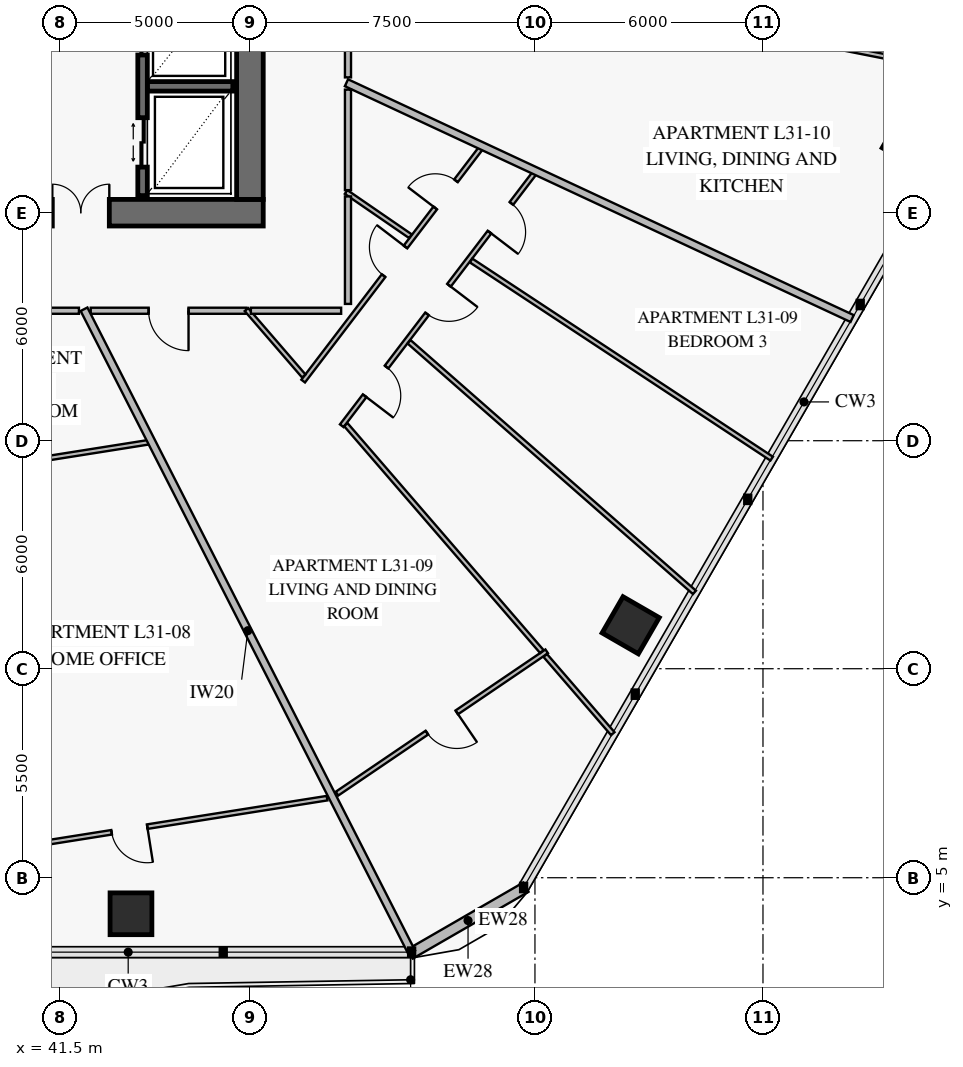
"""IFC4 building model, lengths in metres.
Left out: names, types, materials, properties, quantities, classifications, styles, units other than length and angle.
Written with IfcOpenShell. Run it as: python <this file> out.ifc"""

import sys

from ifc_helpers import new_model, si_unit, direction, frame, frame_2d, origin, origin_2d, place, context, subcontext, project, spatial, rectangle, extrude, element, fill, save


model = new_model("IFC4")
c1 = context("Model", 3, precision=1e-05, world=origin(), true_north=direction((0.0, 1.0)))
c2 = subcontext(c1, "Body", "Model", "MODEL_VIEW")
j1 = project(units=[si_unit("LENGTHUNIT", "METRE"), si_unit("PLANEANGLEUNIT", "RADIAN")], contexts=[c1])
p1 = place(None, origin())
s1 = spatial("IfcSite", under=j1, at=p1, CompositionType="ELEMENT")
p2 = place(p1, origin())
s2 = spatial("IfcBuilding", under=s1, at=p2, CompositionType="ELEMENT")
p3 = place(p2, frame((0.0, 0.0, 126.6)))
s3 = spatial("IfcBuildingStorey", under=s2, at=p3, CompositionType="ELEMENT", Elevation=126.6)
p4 = place(p3, frame((37.35, 22.5, 0.0), z_axis=(0.0, 0.0, 1.0), x_axis=(1.0, 0.0, 0.0)))
e1 = element("IfcWall", 1, at=p4, inside=s3, PredefinedType="SHEAR", context=c2, shape_type="SweptSolid", body=[
    extrude(rectangle(XDim=9.5, YDim=0.7, at=frame_2d((4.75, 0.0))), origin(), (0.0, 0.0, 1.0), 3.8),
])
p5 = place(p4, frame((3.95, 0.0, 0.0)))
e2 = element("IfcOpeningElement", 2, at=p5, cuts=e1, PredefinedType="OPENING", context=c2, shape_type="SweptSolid", body=[
    extrude(rectangle(XDim=1.5, YDim=2.15, at=frame_2d((0.75, 1.075))), frame((0.0, 0.362, 0.0), z_axis=(0.0, -1.0, 0.0), x_axis=(1.0, 0.0, 0.0)), (0.0, 0.0, 1.0), 0.724),
])
p6 = place(p3, frame((46.5, 22.85, 0.0), z_axis=(0.0, 0.0, 1.0), x_axis=(0.0, 1.0, 0.0)))
e3 = element("IfcWall", 3, at=p6, inside=s3, PredefinedType="SHEAR", context=c2, shape_type="SweptSolid", body=[
    extrude(rectangle(XDim=18.3, YDim=0.7, at=frame_2d((9.15, 0.0))), origin(), (0.0, 0.0, 1.0), 3.8),
])
p7 = place(p6, frame((8.9, 0.0, 0.0)))
e4 = element("IfcOpeningElement", 4, at=p7, cuts=e3, PredefinedType="OPENING", context=c2, shape_type="SweptSolid", body=[
    extrude(rectangle(XDim=1.1, YDim=2.15, at=frame_2d((0.55, 1.075))), frame((0.0, 0.362, 0.0), z_axis=(0.0, -1.0, 0.0), x_axis=(1.0, 0.0, 0.0)), (0.0, 0.0, 1.0), 0.724),
])
for number, where, z_axis, x_axis in (
    (5, (43.37, 4.052, 0.0), (0.0, 0.0, 1.0), (1.0, 0.0, 0.0)),
    (6, (56.519, 11.643, 0.0), (0.0, 0.0, 1.0), (0.5, 0.866, 0.0)),
    (7, (63.889, 24.408, 0.0), (0.0, 0.0, 1.0), (0.5, 0.866, 0.0)),
):
    element("IfcColumn", number, at=place(p3, frame(where, z_axis=z_axis, x_axis=x_axis)), inside=s3, PredefinedType="COLUMN", context=c2, shape_type="SweptSolid", body=[
        extrude(rectangle(XDim=1.1, YDim=1.1, at=origin_2d()), origin(), (0.0, 0.0, 1.0), 3.55),
    ])
p8 = place(p3, frame((53.761, 4.751, 0.0), z_axis=(0.0, 0.0, 1.0), x_axis=(-0.866007452331, -0.500031091541, 0.0)))
e8 = element("IfcWall", 8, at=p8, inside=s3, PredefinedType="SOLIDWALL", context=c2, shape_type="SweptSolid", body=[
    extrude(rectangle(XDim=3.515, YDim=0.28, at=frame_2d((1.757, 0.0))), origin(), (0.0, 0.0, 1.0), 3.55),
])
p9 = place(p3, frame((43.8, 25.825, 0.0), z_axis=(0.0, 0.0, 1.0), x_axis=(1.0, 0.0, 0.0)))
e9 = element("IfcWall", 9, at=p9, inside=s3, PredefinedType="SOLIDWALL", context=c2, shape_type="SweptSolid", body=[
    extrude(rectangle(XDim=2.25, YDim=0.25, at=frame_2d((1.125, 0.0))), origin(), (0.0, 0.0, 1.0), 3.8),
])
p10 = place(p3, frame((43.675, 22.95, 0.0), z_axis=(0.0, 0.0, 1.0), x_axis=(0.0, 1.0, 0.0)))
e10 = element("IfcWall", 10, at=p10, inside=s3, PredefinedType="SOLIDWALL", context=c2, shape_type="SweptSolid", body=[
    extrude(rectangle(XDim=8.2, YDim=0.25, at=frame_2d((4.1, 0.0))), origin(), (0.0, 0.0, 1.0), 3.8),
])
p11 = place(p10, frame((0.75, 0.0, 0.0)))
e11 = element("IfcOpeningElement", 11, at=p11, cuts=e10, PredefinedType="OPENING", context=c2, shape_type="SweptSolid", body=[
    extrude(rectangle(XDim=1.3, YDim=2.3, at=frame_2d((0.65, 1.15))), frame((0.0, 0.137, 0.0), z_axis=(0.0, -1.0, 0.0), x_axis=(1.0, 0.0, 0.0)), (0.0, 0.0, 1.0), 0.274),
])
p12 = place(p10, frame((3.7, 0.0, 0.0)))
e12 = element("IfcOpeningElement", 12, at=p12, cuts=e10, PredefinedType="OPENING", context=c2, shape_type="SweptSolid", body=[
    extrude(rectangle(XDim=1.3, YDim=2.3, at=frame_2d((0.65, 1.15))), frame((0.0, 0.137, 0.0), z_axis=(0.0, -1.0, 0.0), x_axis=(1.0, 0.0, 0.0)), (0.0, 0.0, 1.0), 0.274),
])
p13 = place(p10, frame((6.62, 0.0, 0.0)))
e13 = element("IfcOpeningElement", 13, at=p13, cuts=e10, PredefinedType="OPENING", context=c2, shape_type="SweptSolid", body=[
    extrude(rectangle(XDim=0.9, YDim=2.1, at=frame_2d((0.45, 1.05))), frame((0.0, 0.137, 0.0), z_axis=(0.0, -1.0, 0.0), x_axis=(1.0, 0.0, 0.0)), (0.0, 0.0, 1.0), 0.274),
])
p14 = place(p3, frame((38.296, 5.473, 0.0), z_axis=(0.0, 0.0, 1.0), x_axis=(0.987688342725, 0.156434451591, 0.0)))
e14 = element("IfcWall", 14, at=p14, inside=s3, PredefinedType="PARTITIONING", context=c2, shape_type="SweptSolid", body=[
    extrude(rectangle(XDim=10.361, YDim=0.12, at=frame_2d((5.181, 0.0))), origin(), (0.0, 0.0, 1.0), 2.8),
])
p15 = place(p14, frame((4.622, 0.0, 0.0)))
e15 = element("IfcOpeningElement", 15, at=p15, cuts=e14, PredefinedType="OPENING", context=c2, shape_type="SweptSolid", body=[
    extrude(rectangle(XDim=0.95, YDim=2.1, at=frame_2d((0.475, 1.05))), frame((0.0, 0.072, 0.0), z_axis=(0.0, -1.0, 0.0), x_axis=(1.0, 0.0, 0.0)), (0.0, 0.0, 1.0), 0.144),
])
p16 = place(p3, frame((48.791, 7.212, 0.0), z_axis=(0.0, 0.0, 1.0), x_axis=(0.82746544618, 0.561516638559, 0.0)))
e16 = element("IfcWall", 16, at=p16, inside=s3, PredefinedType="PARTITIONING", context=c2, shape_type="SweptSolid", body=[
    extrude(rectangle(XDim=6.668, YDim=0.12, at=frame_2d((3.334, 0.0))), origin(), (0.0, 0.0, 1.0), 2.8),
])
p17 = place(p16, frame((2.859, 0.0, 0.0)))
e17 = element("IfcOpeningElement", 17, at=p17, cuts=e16, PredefinedType="OPENING", context=c2, shape_type="SweptSolid", body=[
    extrude(rectangle(XDim=0.95, YDim=2.1, at=frame_2d((0.475, 1.05))), frame((0.0, 0.072, 0.0), z_axis=(0.0, -1.0, 0.0), x_axis=(1.0, 0.0, 0.0)), (0.0, 0.0, 1.0), 0.144),
])
p18 = place(p3, frame((47.901, 18.069, 0.0), z_axis=(0.0, 0.0, 1.0), x_axis=(0.606532258444, 0.795058877988, 0.0)))
e18 = element("IfcWall", 18, at=p18, inside=s3, PredefinedType="PARTITIONING", context=c2, shape_type="SweptSolid", body=[
    extrude(rectangle(XDim=7.714, YDim=0.12, at=frame_2d((3.857, 0.0))), origin(), (0.0, 0.0, 1.0), 2.85),
])
p19 = place(p18, frame((3.489, 0.0, 0.0)))
e19 = element("IfcOpeningElement", 19, at=p19, cuts=e18, PredefinedType="OPENING", context=c2, shape_type="SweptSolid", body=[
    extrude(rectangle(XDim=0.95, YDim=2.1, at=frame_2d((0.475, 1.05))), frame((0.0, 0.072, 0.0), z_axis=(0.0, -1.0, 0.0), x_axis=(1.0, 0.0, 0.0)), (0.0, 0.0, 1.0), 0.144),
])
p20 = place(p18, frame((5.729, 0.0, 0.0)))
e20 = element("IfcOpeningElement", 20, at=p20, cuts=e18, PredefinedType="OPENING", context=c2, shape_type="SweptSolid", body=[
    extrude(rectangle(XDim=0.9, YDim=2.1, at=frame_2d((0.45, 1.05))), frame((0.0, 0.072, 0.0), z_axis=(0.0, -1.0, 0.0), x_axis=(1.0, 0.0, 0.0)), (0.0, 0.0, 1.0), 0.144),
])
p21 = place(p3, frame((48.917, 16.894, 0.0), z_axis=(0.0, 0.0, 1.0), x_axis=(0.606532810855, 0.795058456566, 0.0)))
e21 = element("IfcWall", 21, at=p21, inside=s3, PredefinedType="PARTITIONING", context=c2, shape_type="SweptSolid", body=[
    extrude(rectangle(XDim=8.352, YDim=0.12, at=frame_2d((4.176, 0.0))), origin(), (0.0, 0.0, 1.0), 2.85),
])
p22 = place(p21, frame((0.993, 0.0, 0.0)))
e22 = element("IfcOpeningElement", 22, at=p22, cuts=e21, PredefinedType="OPENING", context=c2, shape_type="SweptSolid", body=[
    extrude(rectangle(XDim=0.95, YDim=2.1, at=frame_2d((0.475, 1.05))), frame((0.0, 0.072, 0.0), z_axis=(0.0, -1.0, 0.0), x_axis=(1.0, 0.0, 0.0)), (0.0, 0.0, 1.0), 0.144),
])
p23 = place(p21, frame((3.701, 0.0, 0.0)))
e23 = element("IfcOpeningElement", 23, at=p23, cuts=e21, PredefinedType="OPENING", context=c2, shape_type="SweptSolid", body=[
    extrude(rectangle(XDim=0.95, YDim=2.1, at=frame_2d((0.475, 1.05))), frame((0.0, 0.072, 0.0), z_axis=(0.0, -1.0, 0.0), x_axis=(1.0, 0.0, 0.0)), (0.0, 0.0, 1.0), 0.144),
])
p24 = place(p21, frame((6.409, 0.0, 0.0)))
e24 = element("IfcOpeningElement", 24, at=p24, cuts=e21, PredefinedType="OPENING", context=c2, shape_type="SweptSolid", body=[
    extrude(rectangle(XDim=0.95, YDim=2.1, at=frame_2d((0.475, 1.05))), frame((0.0, 0.072, 0.0), z_axis=(0.0, -1.0, 0.0), x_axis=(1.0, 0.0, 0.0)), (0.0, 0.0, 1.0), 0.144),
])
p25 = place(p3, frame((42.311, 19.92, 0.0), z_axis=(0.0, 0.0, 1.0), x_axis=(1.0, 0.0, 0.0)))
e25 = element("IfcWall", 25, at=p25, inside=s3, PredefinedType="PARTITIONING", context=c2, shape_type="SweptSolid", body=[
    extrude(rectangle(XDim=4.097, YDim=0.16, at=frame_2d((2.049, 0.0))), origin(), (0.0, 0.0, 1.0), 3.55),
])
p26 = place(p25, frame((1.523, 0.0, 0.0)))
e26 = element("IfcOpeningElement", 26, at=p26, cuts=e25, PredefinedType="OPENING", context=c2, shape_type="SweptSolid", body=[
    extrude(rectangle(XDim=1.05, YDim=2.15, at=frame_2d((0.525, 1.075))), frame((0.0, 0.092, 0.0), z_axis=(0.0, -1.0, 0.0), x_axis=(1.0, 0.0, 0.0)), (0.0, 0.0, 1.0), 0.184),
])
p27 = place(p3, frame((53.21, 28.592, 0.0), z_axis=(0.0, 0.0, 1.0), x_axis=(0.980957842049, -0.1942207819, 0.0)))
e27 = element("IfcWall", 27, at=p27, inside=s3, PredefinedType="PARTITIONING", context=c2, shape_type="SweptSolid", body=[
    extrude(rectangle(XDim=10.678, YDim=0.12, at=frame_2d((5.339, 0.0))), origin(), (0.0, 0.0, 1.0), 3.1),
])
p28 = place(p27, frame((4.839, 0.0, 0.0)))
e28 = element("IfcOpeningElement", 28, at=p28, cuts=e27, PredefinedType="OPENING", context=c2, shape_type="SweptSolid", body=[
    extrude(rectangle(XDim=0.95, YDim=2.1, at=frame_2d((0.475, 1.05))), frame((0.0, 0.072, 0.0), z_axis=(0.0, -1.0, 0.0), x_axis=(1.0, 0.0, 0.0)), (0.0, 0.0, 1.0), 0.144),
])
p29 = place(p3, frame((49.08, 26.061, 0.0), z_axis=(0.0, 0.0, 1.0), x_axis=(0.0, 1.0, 0.0)))
e29 = element("IfcWall", 29, at=p29, inside=s3, PredefinedType="PARTITIONING", context=c2, shape_type="SweptSolid", body=[
    extrude(rectangle(XDim=3.329, YDim=0.16, at=frame_2d((1.664, 0.0))), origin(), (0.0, 0.0, 1.0), 2.85),
])
p30 = place(p29, frame((1.139, 0.0, 0.0)))
e30 = element("IfcOpeningElement", 30, at=p30, cuts=e29, PredefinedType="OPENING", context=c2, shape_type="SweptSolid", body=[
    extrude(rectangle(XDim=1.05, YDim=2.15, at=frame_2d((0.525, 1.075))), frame((0.0, 0.092, 0.0), z_axis=(0.0, -1.0, 0.0), x_axis=(1.0, 0.0, 0.0)), (0.0, 0.0, 1.0), 0.184),
])
p31 = place(p3, frame((37.458, 15.45, 0.0), z_axis=(0.0, 0.0, 1.0), x_axis=(0.987687698578, 0.156438518521, 0.0)))
e31 = element("IfcWall", 31, at=p31, inside=s3, PredefinedType="PARTITIONING", context=c2, shape_type="SweptSolid", body=[
    extrude(rectangle(XDim=6.48, YDim=0.12, at=frame_2d((3.24, 0.0))), origin(), (0.0, 0.0, 1.0), 2.85),
])
p32 = place(p3, frame((42.135, 19.96, 0.0), z_axis=(0.0, 0.0, 1.0), x_axis=(0.453989534113, -0.891007016199, 0.0)))
e32 = element("IfcWall", 32, at=p32, inside=s3, PredefinedType="PARTITIONING", context=c2, shape_type="SweptSolid", body=[
    extrude(rectangle(XDim=18.988, YDim=0.2, at=frame_2d((9.494, 0.0))), origin(), (0.0, 0.0, 1.0), 2.8),
])
p33 = place(p3, frame((49.03, 23.045, 0.0), z_axis=(0.0, 0.0, 1.0), x_axis=(0.824090441083, -0.5664582464, 0.0)))
e33 = element("IfcWall", 33, at=p33, inside=s3, PredefinedType="PARTITIONING", context=c2, shape_type="SweptSolid", body=[
    extrude(rectangle(XDim=2.055, YDim=0.12, at=frame_2d((1.028, 0.0))), origin(), (0.0, 0.0, 1.0), 3.55),
])
p34 = place(p3, frame((50.687, 19.103, 0.0), z_axis=(0.0, 0.0, 1.0), x_axis=(0.75142693105, -0.659816313297, 0.0)))
e34 = element("IfcWall", 34, at=p34, inside=s3, PredefinedType="PARTITIONING", context=c2, shape_type="SweptSolid", body=[
    extrude(rectangle(XDim=9.994, YDim=0.12, at=frame_2d((4.997, 0.0))), origin(), (0.0, 0.0, 1.0), 2.8),
])
p35 = place(p3, frame((52.319, 21.242, 0.0), z_axis=(0.0, 0.0, 1.0), x_axis=(0.834917563822, -0.550375019075, 0.0)))
e35 = element("IfcWall", 35, at=p35, inside=s3, PredefinedType="PARTITIONING", context=c2, shape_type="SweptSolid", body=[
    extrude(rectangle(XDim=9.473, YDim=0.12, at=frame_2d((4.737, 0.0))), origin(), (0.0, 0.0, 1.0), 2.8),
])
p36 = place(p3, frame((46.408, 19.951, 0.0), z_axis=(0.0, 0.0, 1.0), x_axis=(0.653633631907, -0.756811122566, 0.0)))
e36 = element("IfcWall", 36, at=p36, inside=s3, PredefinedType="PARTITIONING", context=c2, shape_type="SweptSolid", body=[
    extrude(rectangle(XDim=2.309, YDim=0.12, at=frame_2d((1.155, 0.0))), origin(), (0.0, 0.0, 1.0), 3.55),
])
p37 = place(p3, frame((49.024, 16.923, 0.0), z_axis=(0.0, 0.0, 1.0), x_axis=(0.653686738758, -0.756765252619, 0.0)))
e37 = element("IfcWall", 37, at=p37, inside=s3, PredefinedType="PARTITIONING", context=c2, shape_type="SweptSolid", body=[
    extrude(rectangle(XDim=7.889, YDim=0.12, at=frame_2d((3.945, 0.0))), origin(), (0.0, 0.0, 1.0), 3.1),
])
p38 = place(p3, frame((54.271, 10.848, 0.0), z_axis=(0.0, 0.0, 1.0), x_axis=(0.653692329301, -0.756760423524, 0.0)))
e38 = element("IfcWall", 38, at=p38, inside=s3, PredefinedType="PARTITIONING", context=c2, shape_type="SweptSolid", body=[
    extrude(rectangle(XDim=2.719, YDim=0.12, at=frame_2d((1.36, 0.0))), origin(), (0.0, 0.0, 1.0), 2.8),
])
p39 = place(p3, frame((49.04, 25.919, 0.0), z_axis=(0.0, 0.0, 1.0), x_axis=(0.90630970467, -0.422614149338, 0.0)))
e39 = element("IfcWall", 39, at=p39, inside=s3, PredefinedType="PARTITIONING", context=c2, shape_type="SweptSolid", body=[
    extrude(rectangle(XDim=14.681, YDim=0.2, at=frame_2d((7.34, 0.0))), origin(), (0.0, 0.0, 1.0), 2.8),
])
p40 = place(p3, frame((37.083, 19.92, 0.0), z_axis=(0.0, 0.0, 1.0), x_axis=(1.0, 0.0, 0.0)))
e40 = element("IfcWall", 40, at=p40, inside=s3, PredefinedType="PARTITIONING", context=c2, shape_type="SweptSolid", body=[
    extrude(rectangle(XDim=4.918, YDim=0.16, at=frame_2d((2.459, 0.0))), origin(), (0.0, 0.0, 1.0), 2.85),
])
p41 = place(p3, frame((49.08, 20.1, 0.0), z_axis=(0.0, 0.0, 1.0), x_axis=(0.0, 1.0, 0.0)))
e41 = element("IfcWall", 41, at=p41, inside=s3, PredefinedType="PARTITIONING", context=c2, shape_type="SweptSolid", body=[
    extrude(rectangle(XDim=2.828, YDim=0.16, at=frame_2d((1.414, 0.0))), origin(), (0.0, 0.0, 1.0), 3.55),
])
p42 = place(p3, frame((46.524, 19.92, 0.0), z_axis=(0.0, 0.0, 1.0), x_axis=(1.0, 0.0, 0.0)))
e42 = element("IfcWall", 42, at=p42, inside=s3, PredefinedType="PARTITIONING", context=c2, shape_type="SweptSolid", body=[
    extrude(rectangle(XDim=2.375, YDim=0.16, at=frame_2d((1.188, 0.0))), origin(), (0.0, 0.0, 1.0), 2.85),
])
p43 = place(p3, frame((49.08, 23.094, 0.0), z_axis=(0.0, 0.0, 1.0), x_axis=(0.0, 1.0, 0.0)))
e43 = element("IfcWall", 43, at=p43, inside=s3, PredefinedType="PARTITIONING", context=c2, shape_type="SweptSolid", body=[
    extrude(rectangle(XDim=2.646, YDim=0.16, at=frame_2d((1.323, 0.0))), origin(), (0.0, 0.0, 1.0), 3.55),
])
p44 = place(p5, origin())
e44 = element("IfcDoor", 44, at=p44, inside=s3, OperationType="DOUBLE_DOOR_SINGLE_SWING", PredefinedType="DOOR", context=c2, shape_type="SweptSolid", body=[
    extrude(rectangle(XDim=1.5, YDim=2.15, at=frame_2d((0.75, 1.075))), frame((0.0, 0.025, 0.0), z_axis=(0.0, -1.0, 0.0), x_axis=(1.0, 0.0, 0.0)), (0.0, 0.0, 1.0), 0.05),
])
fill(e2, e44)
p45 = place(p11, origin())
e45 = element("IfcDoor", 45, at=p45, inside=s3, OperationType="DOUBLE_DOOR_SLIDING", PredefinedType="DOOR", context=c2, shape_type="SweptSolid", body=[
    extrude(rectangle(XDim=1.3, YDim=2.3, at=frame_2d((0.65, 1.15))), frame((0.0, 0.025, 0.0), z_axis=(0.0, -1.0, 0.0), x_axis=(1.0, 0.0, 0.0)), (0.0, 0.0, 1.0), 0.05),
])
fill(e11, e45)
p46 = place(p12, origin())
e46 = element("IfcDoor", 46, at=p46, inside=s3, OperationType="DOUBLE_DOOR_SLIDING", PredefinedType="DOOR", context=c2, shape_type="SweptSolid", body=[
    extrude(rectangle(XDim=1.3, YDim=2.3, at=frame_2d((0.65, 1.15))), frame((0.0, 0.025, 0.0), z_axis=(0.0, -1.0, 0.0), x_axis=(1.0, 0.0, 0.0)), (0.0, 0.0, 1.0), 0.05),
])
fill(e12, e46)
p47 = place(p15, frame((0.95, 0.0, 0.0), z_axis=(0.0, 0.0, 1.0), x_axis=(-1.0, 0.0, 0.0)))
e47 = element("IfcDoor", 47, at=p47, inside=s3, OperationType="SINGLE_SWING_LEFT", PredefinedType="DOOR", context=c2, shape_type="SweptSolid", body=[
    extrude(rectangle(XDim=0.95, YDim=2.1, at=frame_2d((0.475, 1.05))), frame((0.0, 0.025, 0.0), z_axis=(0.0, -1.0, 0.0), x_axis=(1.0, 0.0, 0.0)), (0.0, 0.0, 1.0), 0.05),
])
fill(e15, e47)
p48 = place(p17, frame((0.95, 0.0, 0.0), z_axis=(0.0, 0.0, 1.0), x_axis=(-1.0, 0.0, 0.0)))
e48 = element("IfcDoor", 48, at=p48, inside=s3, OperationType="SINGLE_SWING_LEFT", PredefinedType="DOOR", context=c2, shape_type="SweptSolid", body=[
    extrude(rectangle(XDim=0.95, YDim=2.1, at=frame_2d((0.475, 1.05))), frame((0.0, 0.025, 0.0), z_axis=(0.0, -1.0, 0.0), x_axis=(1.0, 0.0, 0.0)), (0.0, 0.0, 1.0), 0.05),
])
fill(e17, e48)
p49 = place(p19, origin())
e49 = element("IfcDoor", 49, at=p49, inside=s3, OperationType="SINGLE_SWING_RIGHT", PredefinedType="DOOR", context=c2, shape_type="SweptSolid", body=[
    extrude(rectangle(XDim=0.95, YDim=2.1, at=frame_2d((0.475, 1.05))), frame((0.0, 0.025, 0.0), z_axis=(0.0, -1.0, 0.0), x_axis=(1.0, 0.0, 0.0)), (0.0, 0.0, 1.0), 0.05),
])
fill(e19, e49)
p50 = place(p20, origin())
e50 = element("IfcDoor", 50, at=p50, inside=s3, OperationType="SINGLE_SWING_LEFT", PredefinedType="DOOR", context=c2, shape_type="SweptSolid", body=[
    extrude(rectangle(XDim=0.9, YDim=2.1, at=frame_2d((0.45, 1.05))), frame((0.0, 0.025, 0.0), z_axis=(0.0, -1.0, 0.0), x_axis=(1.0, 0.0, 0.0)), (0.0, 0.0, 1.0), 0.05),
])
fill(e20, e50)
p51 = place(p22, frame((0.95, 0.0, 0.0), z_axis=(0.0, 0.0, 1.0), x_axis=(-1.0, 0.0, 0.0)))
e51 = element("IfcDoor", 51, at=p51, inside=s3, OperationType="SINGLE_SWING_RIGHT", PredefinedType="DOOR", context=c2, shape_type="SweptSolid", body=[
    extrude(rectangle(XDim=0.95, YDim=2.1, at=frame_2d((0.475, 1.05))), frame((0.0, 0.025, 0.0), z_axis=(0.0, -1.0, 0.0), x_axis=(1.0, 0.0, 0.0)), (0.0, 0.0, 1.0), 0.05),
])
fill(e22, e51)
p52 = place(p23, frame((0.95, 0.0, 0.0), z_axis=(0.0, 0.0, 1.0), x_axis=(-1.0, 0.0, 0.0)))
e52 = element("IfcDoor", 52, at=p52, inside=s3, OperationType="SINGLE_SWING_LEFT", PredefinedType="DOOR", context=c2, shape_type="SweptSolid", body=[
    extrude(rectangle(XDim=0.95, YDim=2.1, at=frame_2d((0.475, 1.05))), frame((0.0, 0.025, 0.0), z_axis=(0.0, -1.0, 0.0), x_axis=(1.0, 0.0, 0.0)), (0.0, 0.0, 1.0), 0.05),
])
fill(e23, e52)
p53 = place(p24, frame((0.95, 0.0, 0.0), z_axis=(0.0, 0.0, 1.0), x_axis=(-1.0, 0.0, 0.0)))
e53 = element("IfcDoor", 53, at=p53, inside=s3, OperationType="SINGLE_SWING_RIGHT", PredefinedType="DOOR", context=c2, shape_type="SweptSolid", body=[
    extrude(rectangle(XDim=0.95, YDim=2.1, at=frame_2d((0.475, 1.05))), frame((0.0, 0.025, 0.0), z_axis=(0.0, -1.0, 0.0), x_axis=(1.0, 0.0, 0.0)), (0.0, 0.0, 1.0), 0.05),
])
fill(e24, e53)
p54 = place(p26, frame((1.05, 0.0, 0.0), z_axis=(0.0, 0.0, 1.0), x_axis=(-1.0, 0.0, 0.0)))
e54 = element("IfcDoor", 54, at=p54, inside=s3, OperationType="SINGLE_SWING_LEFT", PredefinedType="DOOR", context=c2, shape_type="SweptSolid", body=[
    extrude(rectangle(XDim=1.05, YDim=2.15, at=frame_2d((0.525, 1.075))), frame((0.0, 0.025, 0.0), z_axis=(0.0, -1.0, 0.0), x_axis=(1.0, 0.0, 0.0)), (0.0, 0.0, 1.0), 0.05),
])
fill(e26, e54)
save(model, sys.argv[1])
